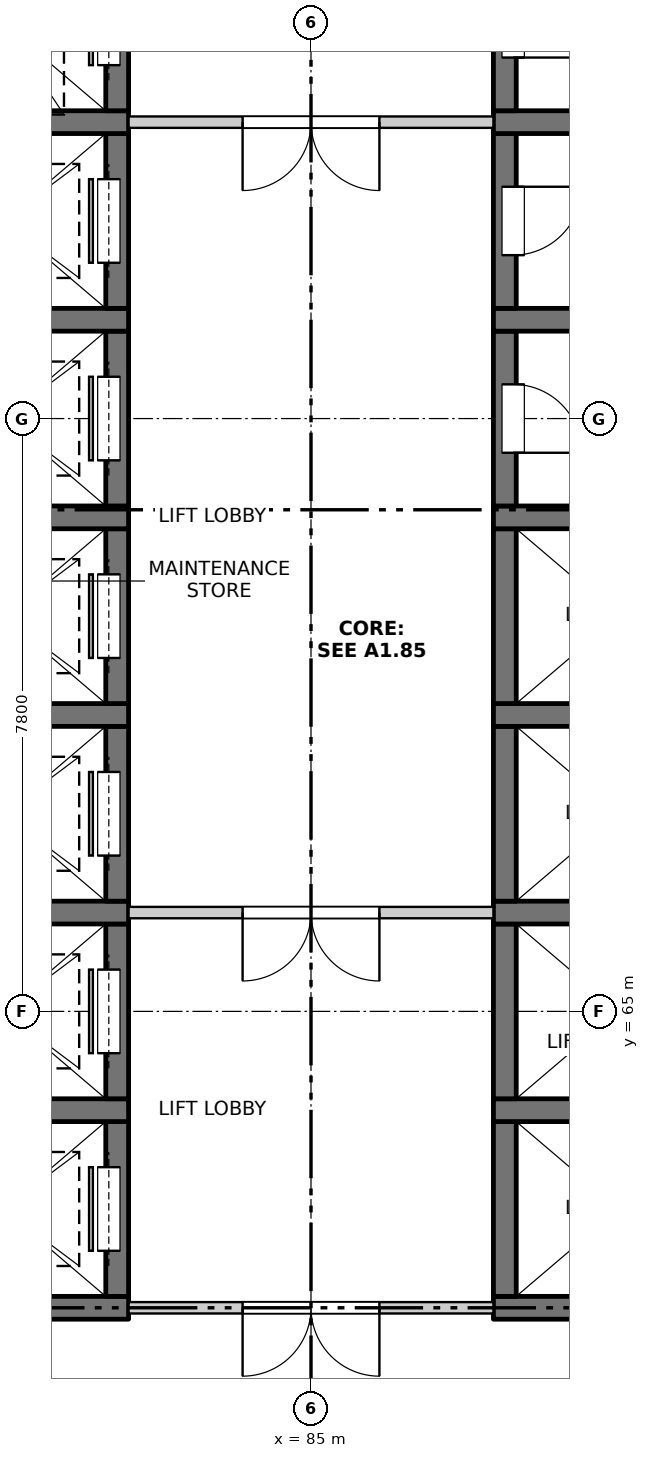
"""IFC4 building model, lengths in metres.
Left out: names, types, materials, properties, quantities, classifications, styles, units other than length and angle.
Written with IfcOpenShell. Run it as: python <this file> out.ifc"""

import sys

from ifc_helpers import new_model, si_unit, direction, frame, frame_2d, origin, place, context, subcontext, project, spatial, rectangle, extrude, element, fill, save


model = new_model("IFC4")
c1 = context("Model", 3, precision=1e-05, world=origin(), true_north=direction((0.0, 1.0)))
c2 = subcontext(c1, "Body", "Model", "MODEL_VIEW")
j1 = project(units=[si_unit("LENGTHUNIT", "METRE"), si_unit("PLANEANGLEUNIT", "RADIAN")], contexts=[c1])
p1 = place(None, origin())
s1 = spatial("IfcSite", under=j1, at=p1, CompositionType="ELEMENT")
p2 = place(p1, origin())
s2 = spatial("IfcBuilding", under=s1, at=p2, CompositionType="ELEMENT")
p3 = place(p2, frame((0.0, 0.0, 113.5)))
s3 = spatial("IfcBuildingStorey", under=s2, at=p3, CompositionType="ELEMENT", Elevation=113.5)
p4 = place(p3, frame((79.6, 61.1, -0.25), z_axis=(0.0, 0.0, 1.0), x_axis=(1.0, 0.0, 0.0)))
e1 = element("IfcWall", 1, at=p4, inside=s3, PredefinedType="SOLIDWALL", context=c2, shape_type="SweptSolid", body=[
    extrude(rectangle(XDim=3.0, YDim=0.3, at=frame_2d((1.5, 0.0))), origin(), (0.0, 0.0, 1.0), 3.35),
])
p5 = place(p3, frame((82.45, 61.25, -0.25), z_axis=(0.0, 0.0, 1.0), x_axis=(0.0, 1.0, 0.0)))
e2 = element("IfcWall", 2, at=p5, inside=s3, PredefinedType="SOLIDWALL", context=c2, shape_type="SweptSolid", body=[
    extrude(rectangle(XDim=2.3, YDim=0.3, at=frame_2d((1.15, 0.0))), origin(), (0.0, 0.0, 1.0), 3.35),
])
p6 = place(p5, frame((0.6, 0.0, 0.25)))
e3 = element("IfcOpeningElement", 3, at=p6, cuts=e2, PredefinedType="OPENING", context=c2, shape_type="SweptSolid", body=[
    extrude(rectangle(XDim=1.1, YDim=2.1, at=frame_2d((0.55, 1.05))), frame((0.0, 0.16, 0.0), z_axis=(0.0, -1.0, 0.0), x_axis=(1.0, 0.0, 0.0)), (0.0, 0.0, 1.0), 0.32),
])
p7 = place(p3, frame((79.6, 63.7, -0.25), z_axis=(0.0, 0.0, 1.0), x_axis=(1.0, 0.0, 0.0)))
e4 = element("IfcWall", 4, at=p7, inside=s3, PredefinedType="SOLIDWALL", context=c2, shape_type="SweptSolid", body=[
    extrude(rectangle(XDim=3.0, YDim=0.3, at=frame_2d((1.5, 0.0))), origin(), (0.0, 0.0, 1.0), 3.35),
])
p8 = place(p3, frame((82.45, 63.85, -0.25), z_axis=(0.0, 0.0, 1.0), x_axis=(0.0, 1.0, 0.0)))
e5 = element("IfcWall", 5, at=p8, inside=s3, PredefinedType="SOLIDWALL", context=c2, shape_type="SweptSolid", body=[
    extrude(rectangle(XDim=2.3, YDim=0.3, at=frame_2d((1.15, 0.0))), origin(), (0.0, 0.0, 1.0), 3.35),
])
p9 = place(p8, frame((0.6, 0.0, 0.25)))
e6 = element("IfcOpeningElement", 6, at=p9, cuts=e5, PredefinedType="OPENING", context=c2, shape_type="SweptSolid", body=[
    extrude(rectangle(XDim=1.1, YDim=2.1, at=frame_2d((0.55, 1.05))), frame((0.0, 0.16, 0.0), z_axis=(0.0, -1.0, 0.0), x_axis=(1.0, 0.0, 0.0)), (0.0, 0.0, 1.0), 0.32),
])
p10 = place(p3, frame((79.6, 66.3, -0.25), z_axis=(0.0, 0.0, 1.0), x_axis=(1.0, 0.0, 0.0)))
e7 = element("IfcWall", 7, at=p10, inside=s3, PredefinedType="SOLIDWALL", context=c2, shape_type="SweptSolid", body=[
    extrude(rectangle(XDim=3.0, YDim=0.3, at=frame_2d((1.5, 0.0))), origin(), (0.0, 0.0, 1.0), 3.35),
])
p11 = place(p3, frame((82.45, 66.45, -0.25), z_axis=(0.0, 0.0, 1.0), x_axis=(0.0, 1.0, 0.0)))
e8 = element("IfcWall", 8, at=p11, inside=s3, PredefinedType="SOLIDWALL", context=c2, shape_type="SweptSolid", body=[
    extrude(rectangle(XDim=2.3, YDim=0.3, at=frame_2d((1.15, 0.0))), origin(), (0.0, 0.0, 1.0), 3.35),
])
p12 = place(p11, frame((0.6, 0.0, 0.25)))
e9 = element("IfcOpeningElement", 9, at=p12, cuts=e8, PredefinedType="OPENING", context=c2, shape_type="SweptSolid", body=[
    extrude(rectangle(XDim=1.1, YDim=2.1, at=frame_2d((0.55, 1.05))), frame((0.0, 0.16, 0.0), z_axis=(0.0, -1.0, 0.0), x_axis=(1.0, 0.0, 0.0)), (0.0, 0.0, 1.0), 0.32),
])
p13 = place(p3, frame((79.6, 68.9, -0.25), z_axis=(0.0, 0.0, 1.0), x_axis=(1.0, 0.0, 0.0)))
e10 = element("IfcWall", 10, at=p13, inside=s3, PredefinedType="SOLIDWALL", context=c2, shape_type="SweptSolid", body=[
    extrude(rectangle(XDim=3.0, YDim=0.3, at=frame_2d((1.5, 0.0))), origin(), (0.0, 0.0, 1.0), 3.35),
])
p14 = place(p3, frame((82.45, 69.05, -0.25), z_axis=(0.0, 0.0, 1.0), x_axis=(0.0, 1.0, 0.0)))
e11 = element("IfcWall", 11, at=p14, inside=s3, PredefinedType="SOLIDWALL", context=c2, shape_type="SweptSolid", body=[
    extrude(rectangle(XDim=2.3, YDim=0.3, at=frame_2d((1.15, 0.0))), origin(), (0.0, 0.0, 1.0), 3.35),
])
p15 = place(p14, frame((0.6, 0.0, 0.25)))
e12 = element("IfcOpeningElement", 12, at=p15, cuts=e11, PredefinedType="OPENING", context=c2, shape_type="SweptSolid", body=[
    extrude(rectangle(XDim=1.1, YDim=2.1, at=frame_2d((0.55, 1.05))), frame((0.0, 0.16, 0.0), z_axis=(0.0, -1.0, 0.0), x_axis=(1.0, 0.0, 0.0)), (0.0, 0.0, 1.0), 0.32),
])
p16 = place(p3, frame((79.6, 71.5, -0.25), z_axis=(0.0, 0.0, 1.0), x_axis=(1.0, 0.0, 0.0)))
e13 = element("IfcWall", 13, at=p16, inside=s3, PredefinedType="SOLIDWALL", context=c2, shape_type="SweptSolid", body=[
    extrude(rectangle(XDim=3.0, YDim=0.3, at=frame_2d((1.5, 0.0))), origin(), (0.0, 0.0, 1.0), 3.35),
])
p17 = place(p3, frame((82.45, 71.65, -0.25), z_axis=(0.0, 0.0, 1.0), x_axis=(0.0, 1.0, 0.0)))
e14 = element("IfcWall", 14, at=p17, inside=s3, PredefinedType="SOLIDWALL", context=c2, shape_type="SweptSolid", body=[
    extrude(rectangle(XDim=2.3, YDim=0.3, at=frame_2d((1.15, 0.0))), origin(), (0.0, 0.0, 1.0), 3.35),
])
p18 = place(p17, frame((0.6, 0.0, 0.25)))
e15 = element("IfcOpeningElement", 15, at=p18, cuts=e14, PredefinedType="OPENING", context=c2, shape_type="SweptSolid", body=[
    extrude(rectangle(XDim=1.1, YDim=2.1, at=frame_2d((0.55, 1.05))), frame((0.0, 0.16, 0.0), z_axis=(0.0, -1.0, 0.0), x_axis=(1.0, 0.0, 0.0)), (0.0, 0.0, 1.0), 0.32),
])
p19 = place(p3, frame((79.6, 74.1, -0.25), z_axis=(0.0, 0.0, 1.0), x_axis=(1.0, 0.0, 0.0)))
e16 = element("IfcWall", 16, at=p19, inside=s3, PredefinedType="SOLIDWALL", context=c2, shape_type="SweptSolid", body=[
    extrude(rectangle(XDim=3.0, YDim=0.3, at=frame_2d((1.5, 0.0))), origin(), (0.0, 0.0, 1.0), 3.35),
])
p20 = place(p3, frame((82.45, 74.25, -0.25), z_axis=(0.0, 0.0, 1.0), x_axis=(0.0, 1.0, 0.0)))
e17 = element("IfcWall", 17, at=p20, inside=s3, PredefinedType="SOLIDWALL", context=c2, shape_type="SweptSolid", body=[
    extrude(rectangle(XDim=2.3, YDim=0.3, at=frame_2d((1.15, 0.0))), origin(), (0.0, 0.0, 1.0), 3.35),
])
p21 = place(p20, frame((0.6, 0.0, 0.25)))
e18 = element("IfcOpeningElement", 18, at=p21, cuts=e17, PredefinedType="OPENING", context=c2, shape_type="SweptSolid", body=[
    extrude(rectangle(XDim=1.1, YDim=2.1, at=frame_2d((0.55, 1.05))), frame((0.0, 0.16, 0.0), z_axis=(0.0, -1.0, 0.0), x_axis=(1.0, 0.0, 0.0)), (0.0, 0.0, 1.0), 0.32),
])
p22 = place(p3, frame((79.6, 76.7, -0.25), z_axis=(0.0, 0.0, 1.0), x_axis=(1.0, 0.0, 0.0)))
e19 = element("IfcWall", 19, at=p22, inside=s3, PredefinedType="SOLIDWALL", context=c2, shape_type="SweptSolid", body=[
    extrude(rectangle(XDim=3.0, YDim=0.3, at=frame_2d((1.5, 0.0))), origin(), (0.0, 0.0, 1.0), 3.35),
])
p23 = place(p3, frame((82.45, 76.85, -0.25), z_axis=(0.0, 0.0, 1.0), x_axis=(0.0, 1.0, 0.0)))
e20 = element("IfcWall", 20, at=p23, inside=s3, PredefinedType="SOLIDWALL", context=c2, shape_type="SweptSolid", body=[
    extrude(rectangle(XDim=2.3, YDim=0.3, at=frame_2d((1.15, 0.0))), origin(), (0.0, 0.0, 1.0), 3.35),
])
p24 = place(p23, frame((0.6, 0.0, 0.25)))
e21 = element("IfcOpeningElement", 21, at=p24, cuts=e20, PredefinedType="OPENING", context=c2, shape_type="SweptSolid", body=[
    extrude(rectangle(XDim=1.1, YDim=2.1, at=frame_2d((0.55, 1.05))), frame((0.0, 0.16, 0.0), z_axis=(0.0, -1.0, 0.0), x_axis=(1.0, 0.0, 0.0)), (0.0, 0.0, 1.0), 0.32),
])
p25 = place(p3, frame((87.4, 61.1, -0.25), z_axis=(0.0, 0.0, 1.0), x_axis=(1.0, 0.0, 0.0)))
e22 = element("IfcWall", 22, at=p25, inside=s3, PredefinedType="SOLIDWALL", context=c2, shape_type="SweptSolid", body=[
    extrude(rectangle(XDim=3.0, YDim=0.3, at=frame_2d((1.5, 0.0))), origin(), (0.0, 0.0, 1.0), 3.35),
])
p26 = place(p3, frame((87.55, 61.25, -0.25), z_axis=(0.0, 0.0, 1.0), x_axis=(0.0, 1.0, 0.0)))
e23 = element("IfcWall", 23, at=p26, inside=s3, PredefinedType="SOLIDWALL", context=c2, shape_type="SweptSolid", body=[
    extrude(rectangle(XDim=2.3, YDim=0.3, at=frame_2d((1.15, 0.0))), origin(), (0.0, 0.0, 1.0), 3.35),
])
p27 = place(p3, frame((87.4, 63.7, -0.25), z_axis=(0.0, 0.0, 1.0), x_axis=(1.0, 0.0, 0.0)))
e24 = element("IfcWall", 24, at=p27, inside=s3, PredefinedType="SOLIDWALL", context=c2, shape_type="SweptSolid", body=[
    extrude(rectangle(XDim=3.0, YDim=0.3, at=frame_2d((1.5, 0.0))), origin(), (0.0, 0.0, 1.0), 3.35),
])
p28 = place(p3, frame((87.55, 63.85, -0.25), z_axis=(0.0, 0.0, 1.0), x_axis=(0.0, 1.0, 0.0)))
e25 = element("IfcWall", 25, at=p28, inside=s3, PredefinedType="SOLIDWALL", context=c2, shape_type="SweptSolid", body=[
    extrude(rectangle(XDim=2.3, YDim=0.3, at=frame_2d((1.15, 0.0))), origin(), (0.0, 0.0, 1.0), 3.35),
])
p29 = place(p3, frame((87.4, 66.3, -0.25), z_axis=(0.0, 0.0, 1.0), x_axis=(1.0, 0.0, 0.0)))
e26 = element("IfcWall", 26, at=p29, inside=s3, PredefinedType="SOLIDWALL", context=c2, shape_type="SweptSolid", body=[
    extrude(rectangle(XDim=3.0, YDim=0.3, at=frame_2d((1.5, 0.0))), origin(), (0.0, 0.0, 1.0), 3.35),
])
p30 = place(p3, frame((87.55, 66.45, -0.25), z_axis=(0.0, 0.0, 1.0), x_axis=(0.0, 1.0, 0.0)))
e27 = element("IfcWall", 27, at=p30, inside=s3, PredefinedType="SOLIDWALL", context=c2, shape_type="SweptSolid", body=[
    extrude(rectangle(XDim=2.3, YDim=0.3, at=frame_2d((1.15, 0.0))), origin(), (0.0, 0.0, 1.0), 3.35),
])
p31 = place(p3, frame((87.4, 68.9, -0.25), z_axis=(0.0, 0.0, 1.0), x_axis=(1.0, 0.0, 0.0)))
e28 = element("IfcWall", 28, at=p31, inside=s3, PredefinedType="SOLIDWALL", context=c2, shape_type="SweptSolid", body=[
    extrude(rectangle(XDim=3.0, YDim=0.3, at=frame_2d((1.5, 0.0))), origin(), (0.0, 0.0, 1.0), 3.35),
])
p32 = place(p3, frame((87.55, 69.05, -0.25), z_axis=(0.0, 0.0, 1.0), x_axis=(0.0, 1.0, 0.0)))
e29 = element("IfcWall", 29, at=p32, inside=s3, PredefinedType="SOLIDWALL", context=c2, shape_type="SweptSolid", body=[
    extrude(rectangle(XDim=2.3, YDim=0.3, at=frame_2d((1.15, 0.0))), origin(), (0.0, 0.0, 1.0), 3.35),
])
p33 = place(p3, frame((87.4, 71.5, -0.25), z_axis=(0.0, 0.0, 1.0), x_axis=(1.0, 0.0, 0.0)))
e30 = element("IfcWall", 30, at=p33, inside=s3, PredefinedType="SOLIDWALL", context=c2, shape_type="SweptSolid", body=[
    extrude(rectangle(XDim=3.0, YDim=0.3, at=frame_2d((1.5, 0.0))), origin(), (0.0, 0.0, 1.0), 3.35),
])
p34 = place(p3, frame((87.55, 71.65, -0.25), z_axis=(0.0, 0.0, 1.0), x_axis=(0.0, 1.0, 0.0)))
e31 = element("IfcWall", 31, at=p34, inside=s3, PredefinedType="SOLIDWALL", context=c2, shape_type="SweptSolid", body=[
    extrude(rectangle(XDim=2.3, YDim=0.3, at=frame_2d((1.15, 0.0))), origin(), (0.0, 0.0, 1.0), 3.35),
])
p35 = place(p34, frame((0.7, 0.0, 0.25)))
e32 = element("IfcOpeningElement", 32, at=p35, cuts=e31, PredefinedType="OPENING", context=c2, shape_type="SweptSolid", body=[
    extrude(rectangle(XDim=0.9, YDim=2.1, at=frame_2d((0.45, 1.05))), frame((0.0, 0.16, 0.0), z_axis=(0.0, -1.0, 0.0), x_axis=(1.0, 0.0, 0.0)), (0.0, 0.0, 1.0), 0.32),
])
p36 = place(p3, frame((87.4, 74.1, -0.25), z_axis=(0.0, 0.0, 1.0), x_axis=(1.0, 0.0, 0.0)))
e33 = element("IfcWall", 33, at=p36, inside=s3, PredefinedType="SOLIDWALL", context=c2, shape_type="SweptSolid", body=[
    extrude(rectangle(XDim=3.0, YDim=0.3, at=frame_2d((1.5, 0.0))), origin(), (0.0, 0.0, 1.0), 3.35),
])
p37 = place(p3, frame((87.55, 74.25, -0.25), z_axis=(0.0, 0.0, 1.0), x_axis=(0.0, 1.0, 0.0)))
e34 = element("IfcWall", 34, at=p37, inside=s3, PredefinedType="SOLIDWALL", context=c2, shape_type="SweptSolid", body=[
    extrude(rectangle(XDim=2.3, YDim=0.3, at=frame_2d((1.15, 0.0))), origin(), (0.0, 0.0, 1.0), 3.35),
])
p38 = place(p37, frame((0.7, 0.0, 0.25)))
e35 = element("IfcOpeningElement", 35, at=p38, cuts=e34, PredefinedType="OPENING", context=c2, shape_type="SweptSolid", body=[
    extrude(rectangle(XDim=0.9, YDim=2.1, at=frame_2d((0.45, 1.05))), frame((0.0, 0.16, 0.0), z_axis=(0.0, -1.0, 0.0), x_axis=(1.0, 0.0, 0.0)), (0.0, 0.0, 1.0), 0.32),
])
p39 = place(p3, frame((87.4, 76.7, -0.25), z_axis=(0.0, 0.0, 1.0), x_axis=(1.0, 0.0, 0.0)))
e36 = element("IfcWall", 36, at=p39, inside=s3, PredefinedType="SOLIDWALL", context=c2, shape_type="SweptSolid", body=[
    extrude(rectangle(XDim=3.0, YDim=0.3, at=frame_2d((1.5, 0.0))), origin(), (0.0, 0.0, 1.0), 3.35),
])
p40 = place(p3, frame((87.55, 76.85, -0.25), z_axis=(0.0, 0.0, 1.0), x_axis=(0.0, 1.0, 0.0)))
e37 = element("IfcWall", 37, at=p40, inside=s3, PredefinedType="SOLIDWALL", context=c2, shape_type="SweptSolid", body=[
    extrude(rectangle(XDim=2.3, YDim=0.3, at=frame_2d((1.15, 0.0))), origin(), (0.0, 0.0, 1.0), 3.35),
])
p41 = place(p40, frame((0.7, 0.0, 0.25)))
e38 = element("IfcOpeningElement", 38, at=p41, cuts=e37, PredefinedType="OPENING", context=c2, shape_type="SweptSolid", body=[
    extrude(rectangle(XDim=0.9, YDim=2.1, at=frame_2d((0.45, 1.05))), frame((0.0, 0.16, 0.0), z_axis=(0.0, -1.0, 0.0), x_axis=(1.0, 0.0, 0.0)), (0.0, 0.0, 1.0), 0.32),
])
p42 = place(p3, frame((82.6, 61.1, 0.0), z_axis=(0.0, 0.0, 1.0), x_axis=(1.0, 0.0, 0.0)))
e39 = element("IfcWall", 39, at=p42, inside=s3, PredefinedType="PARTITIONING", context=c2, shape_type="SweptSolid", body=[
    extrude(rectangle(XDim=4.8, YDim=0.15, at=frame_2d((2.4, 0.0))), origin(), (0.0, 0.0, 1.0), 3.1),
])
p43 = place(p42, frame((1.5, 0.0, 0.0)))
e40 = element("IfcOpeningElement", 40, at=p43, cuts=e39, PredefinedType="OPENING", context=c2, shape_type="SweptSolid", body=[
    extrude(rectangle(XDim=1.8, YDim=2.1, at=frame_2d((0.9, 1.05))), frame((0.0, 0.085, 0.0), z_axis=(0.0, -1.0, 0.0), x_axis=(1.0, 0.0, 0.0)), (0.0, 0.0, 1.0), 0.17),
])
p44 = place(p3, frame((82.6, 66.3, 0.0), z_axis=(0.0, 0.0, 1.0), x_axis=(1.0, 0.0, 0.0)))
e41 = element("IfcWall", 41, at=p44, inside=s3, PredefinedType="PARTITIONING", context=c2, shape_type="SweptSolid", body=[
    extrude(rectangle(XDim=4.8, YDim=0.15, at=frame_2d((2.4, 0.0))), origin(), (0.0, 0.0, 1.0), 3.1),
])
p45 = place(p44, frame((1.5, 0.0, 0.0)))
e42 = element("IfcOpeningElement", 42, at=p45, cuts=e41, PredefinedType="OPENING", context=c2, shape_type="SweptSolid", body=[
    extrude(rectangle(XDim=1.8, YDim=2.1, at=frame_2d((0.9, 1.05))), frame((0.0, 0.085, 0.0), z_axis=(0.0, -1.0, 0.0), x_axis=(1.0, 0.0, 0.0)), (0.0, 0.0, 1.0), 0.17),
])
p46 = place(p3, frame((82.6, 76.7, 0.0), z_axis=(0.0, 0.0, 1.0), x_axis=(1.0, 0.0, 0.0)))
e43 = element("IfcWall", 43, at=p46, inside=s3, PredefinedType="PARTITIONING", context=c2, shape_type="SweptSolid", body=[
    extrude(rectangle(XDim=4.8, YDim=0.15, at=frame_2d((2.4, 0.0))), origin(), (0.0, 0.0, 1.0), 3.1),
])
p47 = place(p46, frame((1.5, 0.0, 0.0)))
e44 = element("IfcOpeningElement", 44, at=p47, cuts=e43, PredefinedType="OPENING", context=c2, shape_type="SweptSolid", body=[
    extrude(rectangle(XDim=1.8, YDim=2.1, at=frame_2d((0.9, 1.05))), frame((0.0, 0.085, 0.0), z_axis=(0.0, -1.0, 0.0), x_axis=(1.0, 0.0, 0.0)), (0.0, 0.0, 1.0), 0.17),
])
p48 = place(p43, origin())
e45 = element("IfcDoor", 45, at=p48, inside=s3, OperationType="DOUBLE_DOOR_SINGLE_SWING", PredefinedType="DOOR", context=c2, shape_type="SweptSolid", body=[
    extrude(rectangle(XDim=1.8, YDim=2.1, at=frame_2d((0.9, 1.05))), frame((0.0, 0.025, 0.0), z_axis=(0.0, -1.0, 0.0), x_axis=(1.0, 0.0, 0.0)), (0.0, 0.0, 1.0), 0.05),
])
fill(e40, e45)
p49 = place(p6, origin())
e46 = element("IfcDoor", 46, at=p49, inside=s3, OperationType="SLIDING_TO_RIGHT", PredefinedType="DOOR", context=c2, shape_type="SweptSolid", body=[
    extrude(rectangle(XDim=1.1, YDim=2.1, at=frame_2d((0.55, 1.05))), frame((0.0, 0.135, 0.0), z_axis=(0.0, -1.0, 0.0), x_axis=(1.0, 0.0, 0.0)), (0.0, 0.0, 1.0), 0.05),
])
fill(e3, e46)
p50 = place(p9, origin())
e47 = element("IfcDoor", 47, at=p50, inside=s3, OperationType="SLIDING_TO_RIGHT", PredefinedType="DOOR", context=c2, shape_type="SweptSolid", body=[
    extrude(rectangle(XDim=1.1, YDim=2.1, at=frame_2d((0.55, 1.05))), frame((0.0, 0.135, 0.0), z_axis=(0.0, -1.0, 0.0), x_axis=(1.0, 0.0, 0.0)), (0.0, 0.0, 1.0), 0.05),
])
fill(e6, e47)
p51 = place(p45, origin())
e48 = element("IfcDoor", 48, at=p51, inside=s3, OperationType="DOUBLE_DOOR_SINGLE_SWING", PredefinedType="DOOR", context=c2, shape_type="SweptSolid", body=[
    extrude(rectangle(XDim=1.8, YDim=2.1, at=frame_2d((0.9, 1.05))), frame((0.0, 0.025, 0.0), z_axis=(0.0, -1.0, 0.0), x_axis=(1.0, 0.0, 0.0)), (0.0, 0.0, 1.0), 0.05),
])
fill(e42, e48)
p52 = place(p12, origin())
e49 = element("IfcDoor", 49, at=p52, inside=s3, OperationType="SLIDING_TO_RIGHT", PredefinedType="DOOR", context=c2, shape_type="SweptSolid", body=[
    extrude(rectangle(XDim=1.1, YDim=2.1, at=frame_2d((0.55, 1.05))), frame((0.0, 0.135, 0.0), z_axis=(0.0, -1.0, 0.0), x_axis=(1.0, 0.0, 0.0)), (0.0, 0.0, 1.0), 0.05),
])
fill(e9, e49)
p53 = place(p15, origin())
e50 = element("IfcDoor", 50, at=p53, inside=s3, OperationType="SLIDING_TO_LEFT", PredefinedType="DOOR", context=c2, shape_type="SweptSolid", body=[
    extrude(rectangle(XDim=1.1, YDim=2.1, at=frame_2d((0.55, 1.05))), frame((0.0, 0.135, 0.0), z_axis=(0.0, -1.0, 0.0), x_axis=(1.0, 0.0, 0.0)), (0.0, 0.0, 1.0), 0.05),
])
fill(e12, e50)
p54 = place(p18, origin())
e51 = element("IfcDoor", 51, at=p54, inside=s3, OperationType="SLIDING_TO_LEFT", PredefinedType="DOOR", context=c2, shape_type="SweptSolid", body=[
    extrude(rectangle(XDim=1.1, YDim=2.1, at=frame_2d((0.55, 1.05))), frame((0.0, 0.135, 0.0), z_axis=(0.0, -1.0, 0.0), x_axis=(1.0, 0.0, 0.0)), (0.0, 0.0, 1.0), 0.05),
])
fill(e15, e51)
p55 = place(p35, origin())
e52 = element("IfcDoor", 52, at=p55, inside=s3, OperationType="SINGLE_SWING_RIGHT", PredefinedType="DOOR", context=c2, shape_type="SweptSolid", body=[
    extrude(rectangle(XDim=0.9, YDim=2.1, at=frame_2d((0.45, 1.05))), frame((0.0, -0.085, 0.0), z_axis=(0.0, -1.0, 0.0), x_axis=(1.0, 0.0, 0.0)), (0.0, 0.0, 1.0), 0.05),
])
fill(e32, e52)
p56 = place(p21, origin())
e53 = element("IfcDoor", 53, at=p56, inside=s3, OperationType="SLIDING_TO_LEFT", PredefinedType="DOOR", context=c2, shape_type="SweptSolid", body=[
    extrude(rectangle(XDim=1.1, YDim=2.1, at=frame_2d((0.55, 1.05))), frame((0.0, 0.135, 0.0), z_axis=(0.0, -1.0, 0.0), x_axis=(1.0, 0.0, 0.0)), (0.0, 0.0, 1.0), 0.05),
])
fill(e18, e53)
p57 = place(p38, origin())
e54 = element("IfcDoor", 54, at=p57, inside=s3, OperationType="SINGLE_SWING_LEFT", PredefinedType="DOOR", context=c2, shape_type="SweptSolid", body=[
    extrude(rectangle(XDim=0.9, YDim=2.1, at=frame_2d((0.45, 1.05))), frame((0.0, -0.085, 0.0), z_axis=(0.0, -1.0, 0.0), x_axis=(1.0, 0.0, 0.0)), (0.0, 0.0, 1.0), 0.05),
])
fill(e35, e54)
p58 = place(p47, origin())
e55 = element("IfcDoor", 55, at=p58, inside=s3, OperationType="DOUBLE_DOOR_SINGLE_SWING", PredefinedType="DOOR", context=c2, shape_type="SweptSolid", body=[
    extrude(rectangle(XDim=1.8, YDim=2.1, at=frame_2d((0.9, 1.05))), frame((0.0, 0.025, 0.0), z_axis=(0.0, -1.0, 0.0), x_axis=(1.0, 0.0, 0.0)), (0.0, 0.0, 1.0), 0.05),
])
fill(e44, e55)
p59 = place(p24, origin())
e56 = element("IfcDoor", 56, at=p59, inside=s3, OperationType="SLIDING_TO_LEFT", PredefinedType="DOOR", context=c2, shape_type="SweptSolid", body=[
    extrude(rectangle(XDim=1.1, YDim=2.1, at=frame_2d((0.55, 1.05))), frame((0.0, 0.135, 0.0), z_axis=(0.0, -1.0, 0.0), x_axis=(1.0, 0.0, 0.0)), (0.0, 0.0, 1.0), 0.05),
])
fill(e21, e56)
p60 = place(p41, origin())
e57 = element("IfcDoor", 57, at=p60, inside=s3, OperationType="SINGLE_SWING_RIGHT", PredefinedType="DOOR", context=c2, shape_type="SweptSolid", body=[
    extrude(rectangle(XDim=0.9, YDim=2.1, at=frame_2d((0.45, 1.05))), frame((0.0, -0.085, 0.0), z_axis=(0.0, -1.0, 0.0), x_axis=(1.0, 0.0, 0.0)), (0.0, 0.0, 1.0), 0.05),
])
fill(e38, e57)
save(model, sys.argv[1])
